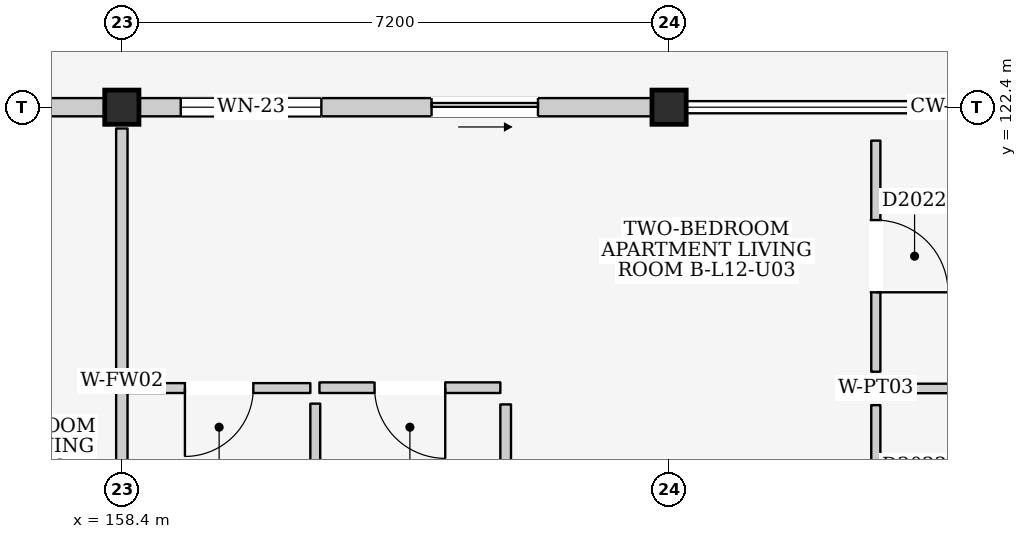
"""IFC4 building model, lengths in metres.
Left out: names, types, materials, properties, quantities, classifications, styles, units other than length and angle.
Written with IfcOpenShell. Run it as: python <this file> out.ifc"""

import sys

from ifc_helpers import new_model, si_unit, direction, frame, frame_2d, origin, origin_2d, place, context, subcontext, project, spatial, rectangle, extrude, element, fill, save


model = new_model("IFC4")
c1 = context("Model", 3, precision=1e-05, world=origin(), true_north=direction((0.0, 1.0)))
c2 = subcontext(c1, "Body", "Model", "MODEL_VIEW")
j1 = project(units=[si_unit("LENGTHUNIT", "METRE"), si_unit("PLANEANGLEUNIT", "RADIAN")], contexts=[c1])
p1 = place(None, origin())
s1 = spatial("IfcSite", under=j1, at=p1, CompositionType="ELEMENT")
p2 = place(p1, origin())
s2 = spatial("IfcBuilding", under=s1, at=p2, CompositionType="ELEMENT")
p3 = place(p2, frame((0.0, 0.0, 41.2)))
s3 = spatial("IfcBuildingStorey", under=s2, at=p3, CompositionType="ELEMENT", Elevation=41.2)
for number, where, z_axis, x_axis in (
    (1, (158.4, 122.4, 0.0), (0.0, 0.0, 1.0), (1.0, 0.0, 0.0)),
    (2, (165.6, 122.4, 0.0), (0.0, 0.0, 1.0), (1.0, 0.0, 0.0)),
):
    element("IfcColumn", number, at=place(p3, frame(where, z_axis=z_axis, x_axis=x_axis)), inside=s3, PredefinedType="COLUMN", context=c2, shape_type="SweptSolid", body=[
        extrude(rectangle(XDim=0.45, YDim=0.45, at=origin_2d()), origin(), (0.0, 0.0, 1.0), 3.2),
    ])
p4 = place(p3, frame((151.425, 122.4, 0.0), z_axis=(0.0, 0.0, 1.0), x_axis=(1.0, 0.0, 0.0)))
e3 = element("IfcWall", 3, at=p4, inside=s3, PredefinedType="ELEMENTEDWALL", context=c2, shape_type="SweptSolid", body=[
    extrude(rectangle(XDim=6.75, YDim=0.24, at=frame_2d((3.375, 0.0))), origin(), (0.0, 0.0, 1.0), 2.495),
])
p5 = place(p4, frame((3.85, 0.0, 0.0)))
e4 = element("IfcOpeningElement", 4, at=p5, cuts=e3, PredefinedType="OPENING", context=c2, shape_type="SweptSolid", body=[
    extrude(rectangle(XDim=2.0, YDim=2.12, at=frame_2d((1.0, 1.06))), frame((0.0, 0.135, 0.0), z_axis=(0.0, -1.0, 0.0), x_axis=(1.0, 0.0, 0.0)), (0.0, 0.0, 1.0), 0.27),
])
p6 = place(p4, frame((0.55, 0.0, 0.9)))
e5 = element("IfcOpeningElement", 5, at=p6, cuts=e3, PredefinedType="OPENING", context=c2, shape_type="SweptSolid", body=[
    extrude(rectangle(XDim=1.55, YDim=1.45, at=frame_2d((0.775, 0.725))), frame((0.0, 0.135, 0.0), z_axis=(0.0, -1.0, 0.0), x_axis=(1.0, 0.0, 0.0)), (0.0, 0.0, 1.0), 0.27),
])
p7 = place(p3, frame((158.625, 122.4, 0.0), z_axis=(0.0, 0.0, 1.0), x_axis=(1.0, 0.0, 0.0)))
e6 = element("IfcWall", 6, at=p7, inside=s3, PredefinedType="ELEMENTEDWALL", context=c2, shape_type="SweptSolid", body=[
    extrude(rectangle(XDim=6.75, YDim=0.24, at=frame_2d((3.375, 0.0))), origin(), (0.0, 0.0, 1.0), 2.495),
])
p8 = place(p7, frame((3.85, 0.0, 0.0)))
e7 = element("IfcOpeningElement", 7, at=p8, cuts=e6, PredefinedType="OPENING", context=c2, shape_type="SweptSolid", body=[
    extrude(rectangle(XDim=1.4, YDim=2.1, at=frame_2d((0.7, 1.05))), frame((0.0, 0.135, 0.0), z_axis=(0.0, -1.0, 0.0), x_axis=(1.0, 0.0, 0.0)), (0.0, 0.0, 1.0), 0.27),
])
p9 = place(p7, frame((0.55, 0.0, 0.9)))
e8 = element("IfcOpeningElement", 8, at=p9, cuts=e6, PredefinedType="OPENING", context=c2, shape_type="SweptSolid", body=[
    extrude(rectangle(XDim=1.85, YDim=1.4, at=frame_2d((0.925, 0.7))), frame((0.0, 0.135, 0.0), z_axis=(0.0, -1.0, 0.0), x_axis=(1.0, 0.0, 0.0)), (0.0, 0.0, 1.0), 0.27),
])
p10 = place(p3, frame((158.4, 115.48, 0.0), z_axis=(0.0, 0.0, 1.0), x_axis=(0.0, 1.0, 0.0)))
e9 = element("IfcWall", 9, at=p10, inside=s3, PredefinedType="PARTITIONING", context=c2, shape_type="SweptSolid", body=[
    extrude(rectangle(XDim=6.64, YDim=0.15, at=frame_2d((3.32, 0.0))), origin(), (0.0, 0.0, 1.0), 2.445),
])
p11 = place(p3, frame((158.48, 118.705, 0.0), z_axis=(0.0, 0.0, 1.0), x_axis=(1.0, 0.0, 0.0)))
e10 = element("IfcWall", 10, at=p11, inside=s3, PredefinedType="PARTITIONING", context=c2, shape_type="SweptSolid", body=[
    extrude(rectangle(XDim=2.4, YDim=0.13, at=frame_2d((1.2, 0.0))), origin(), (0.0, 0.0, 1.0), 2.95),
])
p12 = place(p11, frame((0.75, 0.0, 0.0)))
e11 = element("IfcOpeningElement", 11, at=p12, cuts=e10, PredefinedType="OPENING", context=c2, shape_type="SweptSolid", body=[
    extrude(rectangle(XDim=0.9, YDim=2.1, at=frame_2d((0.45, 1.05))), frame((0.0, 0.08, 0.0), z_axis=(0.0, -1.0, 0.0), x_axis=(1.0, 0.0, 0.0)), (0.0, 0.0, 1.0), 0.16),
])
p13 = place(p3, frame((160.945, 115.46, 0.0), z_axis=(0.0, 0.0, 1.0), x_axis=(0.0, 1.0, 0.0)))
e12 = element("IfcWall", 12, at=p13, inside=s3, PredefinedType="PARTITIONING", context=c2, shape_type="SweptSolid", body=[
    extrude(rectangle(XDim=3.04, YDim=0.13, at=frame_2d((1.52, 0.0))), origin(), (0.0, 0.0, 1.0), 2.95),
])
p14 = place(p3, frame((161.0, 118.71, 0.0), z_axis=(0.0, 0.0, 1.0), x_axis=(1.0, 0.0, 0.0)))
e13 = element("IfcWall", 13, at=p14, inside=s3, PredefinedType="PARTITIONING", context=c2, shape_type="SweptSolid", body=[
    extrude(rectangle(XDim=2.38, YDim=0.14, at=frame_2d((1.19, 0.0))), origin(), (0.0, 0.0, 1.0), 2.95),
])
p15 = place(p14, frame((0.725, 0.0, 0.0)))
e14 = element("IfcOpeningElement", 14, at=p15, cuts=e13, PredefinedType="OPENING", context=c2, shape_type="SweptSolid", body=[
    extrude(rectangle(XDim=0.93, YDim=2.14, at=frame_2d((0.465, 1.07))), frame((0.0, 0.085, 0.0), z_axis=(0.0, -1.0, 0.0), x_axis=(1.0, 0.0, 0.0)), (0.0, 0.0, 1.0), 0.17),
])
p16 = place(p3, frame((163.45, 115.43, 0.0), z_axis=(0.0, 0.0, 1.0), x_axis=(0.0, 1.0, 0.0)))
e15 = element("IfcWall", 15, at=p16, inside=s3, PredefinedType="PARTITIONING", context=c2, shape_type="SweptSolid", body=[
    extrude(rectangle(XDim=3.06, YDim=0.14, at=frame_2d((1.53, 0.0))), origin(), (0.0, 0.0, 1.0), 2.95),
])
p17 = place(p3, frame((168.32, 118.92, 0.0), z_axis=(0.0, 0.0, 1.0), x_axis=(0.0, 1.0, 0.0)))
e16 = element("IfcWall", 16, at=p17, inside=s3, PredefinedType="PARTITIONING", context=c2, shape_type="SweptSolid", body=[
    extrude(rectangle(XDim=3.04, YDim=0.12, at=frame_2d((1.52, 0.0))), origin(), (0.0, 0.0, 1.0), 2.95),
])
p18 = place(p17, frame((1.045, 0.0, 0.0)))
e17 = element("IfcOpeningElement", 17, at=p18, cuts=e16, PredefinedType="OPENING", context=c2, shape_type="SweptSolid", body=[
    extrude(rectangle(XDim=0.95, YDim=2.15, at=frame_2d((0.475, 1.075))), frame((0.0, 0.075, 0.0), z_axis=(0.0, -1.0, 0.0), x_axis=(1.0, 0.0, 0.0)), (0.0, 0.0, 1.0), 0.15),
])
p19 = place(p3, frame((168.52, 118.7, 0.0), z_axis=(0.0, 0.0, 1.0), x_axis=(1.0, 0.0, 0.0)))
e18 = element("IfcWall", 18, at=p19, inside=s3, PredefinedType="PARTITIONING", context=c2, shape_type="SweptSolid", body=[
    extrude(rectangle(XDim=4.06, YDim=0.125, at=frame_2d((2.03, 0.0))), origin(), (0.0, 0.0, 1.0), 2.95),
])
p20 = place(p3, frame((168.32, 115.44, 0.0), z_axis=(0.0, 0.0, 1.0), x_axis=(0.0, 1.0, 0.0)))
e19 = element("IfcWall", 19, at=p20, inside=s3, PredefinedType="PARTITIONING", context=c2, shape_type="SweptSolid", body=[
    extrude(rectangle(XDim=3.04, YDim=0.12, at=frame_2d((1.52, 0.0))), origin(), (0.0, 0.0, 1.0), 2.95),
])
p21 = place(p20, frame((1.04, 0.0, 0.0)))
e20 = element("IfcOpeningElement", 20, at=p21, cuts=e19, PredefinedType="OPENING", context=c2, shape_type="SweptSolid", body=[
    extrude(rectangle(XDim=0.96, YDim=2.15, at=frame_2d((0.48, 1.075))), frame((0.0, 0.075, 0.0), z_axis=(0.0, -1.0, 0.0), x_axis=(1.0, 0.0, 0.0)), (0.0, 0.0, 1.0), 0.15),
])
p22 = place(p8, frame((1.4, 0.0, 0.0), z_axis=(0.0, 0.0, 1.0), x_axis=(-1.0, 0.0, 0.0)))
e21 = element("IfcDoor", 21, at=p22, inside=s3, OperationType="SLIDING_TO_RIGHT", PredefinedType="DOOR", context=c2, shape_type="SweptSolid", body=[
    extrude(rectangle(XDim=1.4, YDim=2.1, at=frame_2d((0.7, 1.05))), frame((0.0, 0.025, 0.0), z_axis=(0.0, -1.0, 0.0), x_axis=(1.0, 0.0, 0.0)), (0.0, 0.0, 1.0), 0.05),
])
fill(e7, e21)
p23 = place(p9, origin())
e22 = element("IfcWindow", 22, at=p23, inside=s3, PartitioningType="DOUBLE_PANEL_VERTICAL", PredefinedType="WINDOW", context=c2, shape_type="SweptSolid", body=[
    extrude(rectangle(XDim=1.85, YDim=1.4, at=frame_2d((0.925, 0.7))), frame((0.0, 0.03, 0.0), z_axis=(0.0, -1.0, 0.0), x_axis=(1.0, 0.0, 0.0)), (0.0, 0.0, 1.0), 0.06),
])
fill(e8, e22)
p24 = place(p12, frame((0.9, 0.0, 0.0), z_axis=(0.0, 0.0, 1.0), x_axis=(-1.0, 0.0, 0.0)))
e23 = element("IfcDoor", 23, at=p24, inside=s3, OperationType="SINGLE_SWING_RIGHT", PredefinedType="DOOR", context=c2, shape_type="SweptSolid", body=[
    extrude(rectangle(XDim=0.9, YDim=2.1, at=frame_2d((0.45, 1.05))), frame((0.0, 0.025, 0.0), z_axis=(0.0, -1.0, 0.0), x_axis=(1.0, 0.0, 0.0)), (0.0, 0.0, 1.0), 0.05),
])
fill(e11, e23)
p25 = place(p15, frame((0.93, 0.0, 0.0), z_axis=(0.0, 0.0, 1.0), x_axis=(-1.0, 0.0, 0.0)))
e24 = element("IfcDoor", 24, at=p25, inside=s3, OperationType="SINGLE_SWING_LEFT", PredefinedType="DOOR", context=c2, shape_type="SweptSolid", body=[
    extrude(rectangle(XDim=0.93, YDim=2.14, at=frame_2d((0.465, 1.07))), frame((0.0, 0.025, 0.0), z_axis=(0.0, -1.0, 0.0), x_axis=(1.0, 0.0, 0.0)), (0.0, 0.0, 1.0), 0.05),
])
fill(e14, e24)
p26 = place(p18, frame((0.95, 0.0, 0.0), z_axis=(0.0, 0.0, 1.0), x_axis=(-1.0, 0.0, 0.0)))
e25 = element("IfcDoor", 25, at=p26, inside=s3, OperationType="SINGLE_SWING_RIGHT", PredefinedType="DOOR", context=c2, shape_type="SweptSolid", body=[
    extrude(rectangle(XDim=0.95, YDim=2.15, at=frame_2d((0.475, 1.075))), frame((0.0, 0.025, 0.0), z_axis=(0.0, -1.0, 0.0), x_axis=(1.0, 0.0, 0.0)), (0.0, 0.0, 1.0), 0.05),
])
fill(e17, e25)
save(model, sys.argv[1])
